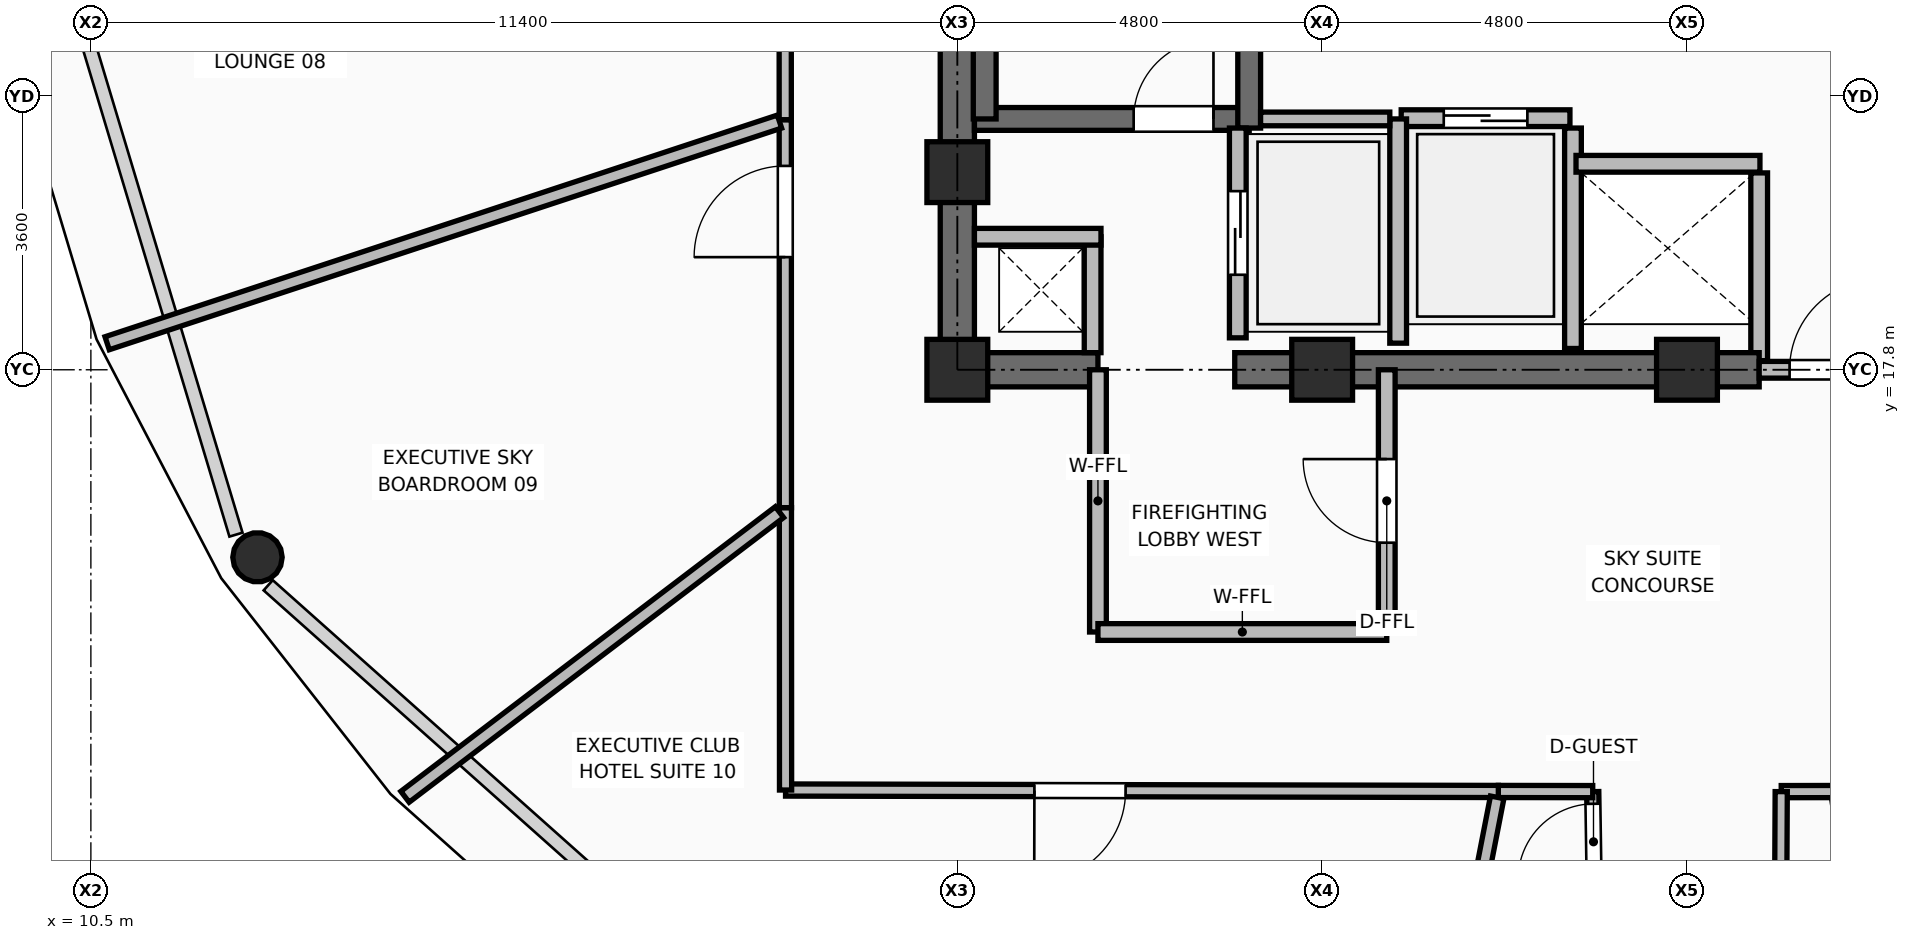
"""IFC4 building model, lengths in metres.
Left out: names, types, materials, properties, quantities, classifications, styles, units other than length and angle.
Written with IfcOpenShell. Run it as: python <this file> out.ifc"""

import sys

from ifc_helpers import new_model, si_unit, direction, frame, frame_2d, origin, origin_2d, place, context, subcontext, project, spatial, rectangle, hollow_circle, extrude, element, fill, save


model = new_model("IFC4")
c1 = context("Model", 3, precision=1e-05, world=origin(), true_north=direction((0.0, 1.0)))
c2 = subcontext(c1, "Body", "Model", "MODEL_VIEW")
j1 = project(units=[si_unit("LENGTHUNIT", "METRE"), si_unit("PLANEANGLEUNIT", "RADIAN")], contexts=[c1])
p1 = place(None, origin())
s1 = spatial("IfcSite", under=j1, at=p1, CompositionType="ELEMENT")
p2 = place(p1, origin())
s2 = spatial("IfcBuilding", under=s1, at=p2, CompositionType="ELEMENT")
p3 = place(p2, frame((0.0, 0.0, 249.9)))
s3 = spatial("IfcBuildingStorey", under=s2, at=p3, CompositionType="ELEMENT", Elevation=249.9)
for number, where, z_axis, x_axis in (
    (1, (21.9, 17.8, 0.0), (0.0, 0.0, 1.0), (1.0, 0.0, 0.0)),
    (2, (26.7, 17.8, 0.0), (0.0, 0.0, 1.0), (1.0, 0.0, 0.0)),
    (3, (31.5, 17.8, 0.0), (0.0, 0.0, 1.0), (1.0, 0.0, 0.0)),
    (4, (21.9, 20.4, 0.0), (0.0, 0.0, 1.0), (1.0, 0.0, 0.0)),
):
    element("IfcColumn", number, at=place(p3, frame(where, z_axis=z_axis, x_axis=x_axis)), inside=s3, PredefinedType="COLUMN", context=c2, shape_type="SweptSolid", body=[
        extrude(rectangle(XDim=0.8, YDim=0.8, at=origin_2d()), origin(), (0.0, 0.0, 1.0), 3.75),
    ])
p4 = place(p3, frame((12.692, 15.333, 0.0), z_axis=(0.09041731247, 0.046908751519, 0.9947986121), x_axis=(-0.460516000373, 0.887651403086, 0.0)))
e5 = element("IfcColumn", 5, at=p4, inside=s3, PredefinedType="COLUMN", context=c2, shape_type="SweptSolid", body=[
    extrude(hollow_circle(Radius=0.325, WallThickness=0.03, at=origin_2d()), origin(), (0.0, 0.0, 1.0), 3.518),
])
p5 = place(p3, frame((30.0, 18.08, 0.0), z_axis=(0.0, 0.0, 1.0), x_axis=(0.0, 1.0, 0.0)))
e6 = element("IfcWall", 6, at=p5, inside=s3, PredefinedType="PARTITIONING", context=c2, shape_type="SweptSolid", body=[
    extrude(rectangle(XDim=2.9, YDim=0.22, at=frame_2d((1.45, 0.0))), origin(), (0.0, 0.0, 1.0), 3.475),
])
p6 = place(p3, frame((32.45, 17.92, 0.0), z_axis=(0.0, 0.0, 1.0), x_axis=(0.0, 1.0, 0.0)))
e7 = element("IfcWall", 7, at=p6, inside=s3, PredefinedType="PARTITIONING", context=c2, shape_type="SweptSolid", body=[
    extrude(rectangle(XDim=2.47, YDim=0.22, at=frame_2d((1.235, 0.0))), origin(), (0.0, 0.0, 1.0), 3.475),
])
p7 = place(p3, frame((21.675, 17.8, 0.0), z_axis=(0.0, 0.0, 1.0), x_axis=(1.0, 0.0, 0.0)))
e8 = element("IfcWall", 8, at=p7, inside=s3, PredefinedType="SHEAR", context=c2, shape_type="SweptSolid", body=[
    extrude(rectangle(XDim=2.075, YDim=0.45, at=frame_2d((1.038, 0.0))), origin(), (0.0, 0.0, 1.0), 3.5),
])
p8 = place(p3, frame((25.55, 17.8, 0.0), z_axis=(0.0, 0.0, 1.0), x_axis=(1.0, 0.0, 0.0)))
e9 = element("IfcWall", 9, at=p8, inside=s3, PredefinedType="SHEAR", context=c2, shape_type="SweptSolid", body=[
    extrude(rectangle(XDim=6.9, YDim=0.45, at=frame_2d((3.45, 0.0))), origin(), (0.0, 0.0, 1.0), 3.5),
])
p9 = place(p3, frame((32.45, 17.8, 0.0), z_axis=(0.0, 0.0, 1.0), x_axis=(1.0, 0.0, 0.0)))
e10 = element("IfcWall", 10, at=p9, inside=s3, PredefinedType="PARTITIONING", context=c2, shape_type="SweptSolid", body=[
    extrude(rectangle(XDim=2.5, YDim=0.22, at=frame_2d((1.25, 0.0))), origin(), (0.0, 0.0, 1.0), 3.012),
])
p10 = place(p9, frame((0.4, 0.0, 0.0)))
e11 = element("IfcOpeningElement", 11, at=p10, cuts=e10, PredefinedType="OPENING", context=c2, shape_type="SweptSolid", body=[
    extrude(rectangle(XDim=1.2, YDim=2.1, at=frame_2d((0.6, 1.05))), frame((0.0, 0.12, 0.0), z_axis=(0.0, -1.0, 0.0), x_axis=(1.0, 0.0, 0.0)), (0.0, 0.0, 1.0), 0.24),
])
p11 = place(p3, frame((21.9, 18.025, 0.0), z_axis=(0.0, 0.0, 1.0), x_axis=(0.0, 1.0, 0.0)))
e12 = element("IfcWall", 12, at=p11, inside=s3, PredefinedType="SHEAR", context=c2, shape_type="SweptSolid", body=[
    extrude(rectangle(XDim=14.2, YDim=0.45, at=frame_2d((7.1, 0.0))), origin(), (0.0, 0.0, 1.0), 3.5),
])
p12 = place(p3, frame((22.125, 21.1, 0.0), z_axis=(0.0, 0.0, 1.0), x_axis=(1.0, 0.0, 0.0)))
e13 = element("IfcWall", 13, at=p12, inside=s3, PredefinedType="SHEAR", context=c2, shape_type="SweptSolid", body=[
    extrude(rectangle(XDim=3.615, YDim=0.3, at=frame_2d((1.808, 0.0))), origin(), (0.0, 0.0, 1.0), 3.5),
])
p13 = place(p12, frame((2.095, 0.0, 0.0)))
e14 = element("IfcOpeningElement", 14, at=p13, cuts=e13, PredefinedType="OPENING", context=c2, shape_type="SweptSolid", body=[
    extrude(rectangle(XDim=1.05, YDim=2.1, at=frame_2d((0.525, 1.05))), frame((0.0, 0.16, 0.0), z_axis=(0.0, -1.0, 0.0), x_axis=(1.0, 0.0, 0.0)), (0.0, 0.0, 1.0), 0.32),
])
p14 = place(p3, frame((25.74, 20.98, 0.0), z_axis=(0.0, 0.0, 1.0), x_axis=(0.0, 1.0, 0.0)))
e15 = element("IfcWall", 15, at=p14, inside=s3, PredefinedType="SHEAR", context=c2, shape_type="SweptSolid", body=[
    extrude(rectangle(XDim=7.99, YDim=0.3, at=frame_2d((3.995, 0.0))), origin(), (0.0, 0.0, 1.0), 3.5),
])
p15 = place(p3, frame((22.26, 21.1, 0.0), z_axis=(0.0, 0.0, 1.0), x_axis=(0.0, 1.0, 0.0)))
e16 = element("IfcWall", 16, at=p15, inside=s3, PredefinedType="SHEAR", context=c2, shape_type="SweptSolid", body=[
    extrude(rectangle(XDim=7.75, YDim=0.3, at=frame_2d((3.875, 0.0))), origin(), (0.0, 0.0, 1.0), 3.5),
])
p16 = place(p3, frame((23.68, 18.025, 0.0), z_axis=(0.0, 0.0, 1.0), x_axis=(0.0, 1.0, 0.0)))
e17 = element("IfcWall", 17, at=p16, inside=s3, PredefinedType="PARTITIONING", context=c2, shape_type="SweptSolid", body=[
    extrude(rectangle(XDim=1.525, YDim=0.22, at=frame_2d((0.763, 0.0))), origin(), (0.0, 0.0, 1.0), 3.48),
])
p17 = place(p3, frame((22.125, 19.55, 0.0), z_axis=(0.0, 0.0, 1.0), x_axis=(1.0, 0.0, 0.0)))
e18 = element("IfcWall", 18, at=p17, inside=s3, PredefinedType="PARTITIONING", context=c2, shape_type="SweptSolid", body=[
    extrude(rectangle(XDim=1.665, YDim=0.22, at=frame_2d((0.833, 0.0))), origin(), (0.0, 0.0, 1.0), 2.525),
])
p18 = place(p3, frame((25.59, 18.22, 0.0), z_axis=(0.0, 0.0, 1.0), x_axis=(0.0, 1.0, 0.0)))
e19 = element("IfcWall", 19, at=p18, inside=s3, PredefinedType="PARTITIONING", context=c2, shape_type="SweptSolid", body=[
    extrude(rectangle(XDim=2.76, YDim=0.22, at=frame_2d((1.38, 0.0))), origin(), (0.0, 0.0, 1.0), 3.48),
])
p19 = place(p18, frame((0.83, 0.0, 0.0)))
e20 = element("IfcOpeningElement", 20, at=p19, cuts=e19, PredefinedType="OPENING", context=c2, shape_type="SweptSolid", body=[
    extrude(rectangle(XDim=1.1, YDim=2.2, at=frame_2d((0.55, 1.1))), frame((0.0, 0.12, 0.0), z_axis=(0.0, -1.0, 0.0), x_axis=(1.0, 0.0, 0.0)), (0.0, 0.0, 1.0), 0.24),
])
p20 = place(p3, frame((27.74, 21.11, 0.0), z_axis=(0.0, 0.0, 1.0), x_axis=(1.0, 0.0, 0.0)))
e21 = element("IfcWall", 21, at=p20, inside=s3, PredefinedType="PARTITIONING", context=c2, shape_type="SweptSolid", body=[
    extrude(rectangle(XDim=2.22, YDim=0.22, at=frame_2d((1.11, 0.0))), origin(), (0.0, 0.0, 1.0), 3.48),
])
p21 = place(p20, frame((0.56, 0.0, 0.0)))
e22 = element("IfcOpeningElement", 22, at=p21, cuts=e21, PredefinedType="OPENING", context=c2, shape_type="SweptSolid", body=[
    extrude(rectangle(XDim=1.1, YDim=2.2, at=frame_2d((0.55, 1.1))), frame((0.0, 0.12, 0.0), z_axis=(0.0, -1.0, 0.0), x_axis=(1.0, 0.0, 0.0)), (0.0, 0.0, 1.0), 0.24),
])
p22 = place(p3, frame((30.04, 20.51, 0.0), z_axis=(0.0, 0.0, 1.0), x_axis=(1.0, 0.0, 0.0)))
e23 = element("IfcWall", 23, at=p22, inside=s3, PredefinedType="PARTITIONING", context=c2, shape_type="SweptSolid", body=[
    extrude(rectangle(XDim=2.42, YDim=0.22, at=frame_2d((1.21, 0.0))), origin(), (0.0, 0.0, 1.0), 3.48),
])
p23 = place(p3, frame((27.7, 18.15, 0.0), z_axis=(0.0, 0.0, 1.0), x_axis=(0.0, 1.0, 0.0)))
e24 = element("IfcWall", 24, at=p23, inside=s3, PredefinedType="PARTITIONING", context=c2, shape_type="SweptSolid", body=[
    extrude(rectangle(XDim=2.95, YDim=0.22, at=frame_2d((1.475, 0.0))), origin(), (0.0, 0.0, 1.0), 3.48),
])
p24 = place(p3, frame((25.89, 21.1, 0.0), z_axis=(0.0, 0.0, 1.0), x_axis=(1.0, 0.0, 0.0)))
e25 = element("IfcWall", 25, at=p24, inside=s3, PredefinedType="PARTITIONING", context=c2, shape_type="SweptSolid", body=[
    extrude(rectangle(XDim=1.7, YDim=0.18, at=frame_2d((0.85, 0.0))), origin(), (0.0, 0.0, 1.0), 3.48),
])
p25 = place(p3, frame((23.75, 14.35, 0.0), z_axis=(0.0, 0.0, 1.0), x_axis=(0.0, 1.0, 0.0)))
e26 = element("IfcWall", 26, at=p25, inside=s3, PredefinedType="PARTITIONING", context=c2, shape_type="SweptSolid", body=[
    extrude(rectangle(XDim=3.45, YDim=0.22, at=frame_2d((1.725, 0.0))), origin(), (0.0, 0.0, 1.0), 3.012),
])
p26 = place(p3, frame((23.75, 14.35, 0.0), z_axis=(0.0, 0.0, 1.0), x_axis=(1.0, 0.0, 0.0)))
e27 = element("IfcWall", 27, at=p26, inside=s3, PredefinedType="PARTITIONING", context=c2, shape_type="SweptSolid", body=[
    extrude(rectangle(XDim=3.8, YDim=0.22, at=frame_2d((1.9, 0.0))), origin(), (0.0, 0.0, 1.0), 3.48),
])
p27 = place(p3, frame((27.55, 14.35, 0.0), z_axis=(0.0, 0.0, 1.0), x_axis=(0.0, 1.0, 0.0)))
e28 = element("IfcWall", 28, at=p27, inside=s3, PredefinedType="PARTITIONING", context=c2, shape_type="SweptSolid", body=[
    extrude(rectangle(XDim=3.45, YDim=0.22, at=frame_2d((1.725, 0.0))), origin(), (0.0, 0.0, 1.0), 3.012),
])
p28 = place(p27, frame((1.175, 0.0, 0.0)))
e29 = element("IfcOpeningElement", 29, at=p28, cuts=e28, PredefinedType="OPENING", context=c2, shape_type="SweptSolid", body=[
    extrude(rectangle(XDim=1.1, YDim=2.1, at=frame_2d((0.55, 1.05))), frame((0.0, 0.12, 0.0), z_axis=(0.0, -1.0, 0.0), x_axis=(1.0, 0.0, 0.0)), (0.0, 0.0, 1.0), 0.24),
])
p29 = place(p3, frame((33.479, 12.251, 0.0), z_axis=(0.0, 0.0, 1.0), x_axis=(-0.999999126899, -0.001321439216, 0.0)))
e30 = element("IfcWall", 30, at=p29, inside=s3, PredefinedType="PARTITIONING", context=c2, shape_type="SweptSolid", body=[
    extrude(rectangle(XDim=0.739, YDim=0.16, at=frame_2d((0.37, 0.0))), origin(), (0.0, 0.0, 1.0), 3.48),
])
p30 = place(p3, frame((32.74, 12.25, 0.0), z_axis=(0.0, 0.0, 1.0), x_axis=(-0.005066629207, -0.999987164552, 0.0)))
e31 = element("IfcWall", 31, at=p30, inside=s3, PredefinedType="PARTITIONING", context=c2, shape_type="SweptSolid", body=[
    extrude(rectangle(XDim=2.361, YDim=0.16, at=frame_2d((1.181, 0.0))), origin(), (0.0, 0.0, 1.0), 3.48),
])
p31 = place(p3, frame((30.296, 9.877, 0.0), z_axis=(0.0, 0.0, 1.0), x_axis=(-0.015121727576, 0.999885660141, 0.0)))
e32 = element("IfcWall", 32, at=p31, inside=s3, PredefinedType="PARTITIONING", context=c2, shape_type="SweptSolid", body=[
    extrude(rectangle(XDim=2.373, YDim=0.16, at=frame_2d((1.187, 0.0))), origin(), (0.0, 0.0, 1.0), 3.48),
])
p32 = place(p31, frame((1.213, 0.0, 0.0)))
e33 = element("IfcOpeningElement", 33, at=p32, cuts=e32, PredefinedType="OPENING", context=c2, shape_type="SweptSolid", body=[
    extrude(rectangle(XDim=1.0, YDim=2.1, at=frame_2d((0.5, 1.05))), frame((0.0, 0.09, 0.0), z_axis=(0.0, -1.0, 0.0), x_axis=(1.0, 0.0, 0.0)), (0.0, 0.0, 1.0), 0.18),
])
p33 = place(p3, frame((30.26, 12.25, 0.0), z_axis=(0.0, 0.0, 1.0), x_axis=(-0.99999876341, 0.001572634187, 0.0)))
e34 = element("IfcWall", 34, at=p33, inside=s3, PredefinedType="PARTITIONING", context=c2, shape_type="SweptSolid", body=[
    extrude(rectangle(XDim=1.242, YDim=0.16, at=frame_2d((0.621, 0.0))), origin(), (0.0, 0.0, 1.0), 3.48),
])
p34 = place(p3, frame((29.018, 12.252, 0.0), z_axis=(0.0, 0.0, 1.0), x_axis=(-0.999997938414, 0.002030558384, 0.0)))
e35 = element("IfcWall", 35, at=p34, inside=s3, PredefinedType="PARTITIONING", context=c2, shape_type="SweptSolid", body=[
    extrude(rectangle(XDim=9.378, YDim=0.16, at=frame_2d((4.689, 0.0))), origin(), (0.0, 0.0, 1.0), 3.012),
])
p35 = place(p34, frame((4.904, 0.0, 0.0)))
e36 = element("IfcOpeningElement", 36, at=p35, cuts=e35, PredefinedType="OPENING", context=c2, shape_type="SweptSolid", body=[
    extrude(rectangle(XDim=1.2, YDim=2.1, at=frame_2d((0.6, 1.05))), frame((0.0, 0.09, 0.0), z_axis=(0.0, -1.0, 0.0), x_axis=(1.0, 0.0, 0.0)), (0.0, 0.0, 1.0), 0.18),
])
p36 = place(p3, frame((19.64, 12.271, 0.0), z_axis=(0.0, 0.0, 1.0), x_axis=(-0.000525727732, 0.999999861805, 0.0)))
e37 = element("IfcWall", 37, at=p36, inside=s3, PredefinedType="PARTITIONING", context=c2, shape_type="SweptSolid", body=[
    extrude(rectangle(XDim=3.715, YDim=0.16, at=frame_2d((1.857, 0.0))), origin(), (0.0, 0.0, 1.0), 3.48),
])
p37 = place(p3, frame((19.638, 15.986, 0.0), z_axis=(0.0, 0.0, 1.0), x_axis=(-0.000382665236, 0.999999926784, 0.0)))
e38 = element("IfcWall", 38, at=p37, inside=s3, PredefinedType="PARTITIONING", context=c2, shape_type="SweptSolid", body=[
    extrude(rectangle(XDim=5.104, YDim=0.16, at=frame_2d((2.552, 0.0))), origin(), (0.0, 0.0, 1.0), 3.012),
])
p38 = place(p37, frame((3.296, 0.0, 0.0)))
e39 = element("IfcOpeningElement", 39, at=p38, cuts=e38, PredefinedType="OPENING", context=c2, shape_type="SweptSolid", body=[
    extrude(rectangle(XDim=1.2, YDim=2.1, at=frame_2d((0.6, 1.05))), frame((0.0, 0.09, 0.0), z_axis=(0.0, -1.0, 0.0), x_axis=(1.0, 0.0, 0.0)), (0.0, 0.0, 1.0), 0.18),
])
p39 = place(p3, frame((19.636, 21.09, 0.0), z_axis=(0.0, 0.0, 1.0), x_axis=(-0.000353325656, 0.99999993758, 0.0)))
e40 = element("IfcWall", 40, at=p39, inside=s3, PredefinedType="PARTITIONING", context=c2, shape_type="SweptSolid", body=[
    extrude(rectangle(XDim=2.764, YDim=0.16, at=frame_2d((1.382, 0.0))), origin(), (0.0, 0.0, 1.0), 3.012),
])
p40 = place(p39, frame((1.404, 0.0, 0.0)))
e41 = element("IfcOpeningElement", 41, at=p40, cuts=e40, PredefinedType="OPENING", context=c2, shape_type="SweptSolid", body=[
    extrude(rectangle(XDim=1.2, YDim=2.1, at=frame_2d((0.6, 1.05))), frame((0.0, 0.09, 0.0), z_axis=(0.0, -1.0, 0.0), x_axis=(1.0, 0.0, 0.0)), (0.0, 0.0, 1.0), 0.18),
])
p41 = place(p3, frame((19.56, 21.065, 0.0), z_axis=(0.0, 0.0, 1.0), x_axis=(-0.949729147415, -0.313072749613, 0.0)))
e42 = element("IfcWall", 42, at=p41, inside=s3, PredefinedType="PARTITIONING", context=c2, shape_type="SweptSolid", body=[
    extrude(rectangle(XDim=9.314, YDim=0.18, at=frame_2d((4.657, 0.0))), origin(), (0.0, 0.0, 1.0), 2.855),
])
p42 = place(p3, frame((19.56, 15.927, 0.0), z_axis=(0.0, 0.0, 1.0), x_axis=(-0.796115821465, -0.605144279336, 0.0)))
e43 = element("IfcWall", 43, at=p42, inside=s3, PredefinedType="PARTITIONING", context=c2, shape_type="SweptSolid", body=[
    extrude(rectangle(XDim=6.189, YDim=0.18, at=frame_2d((3.094, 0.0))), origin(), (0.0, 0.0, 1.0), 2.855),
])
p43 = place(p3, frame((29.003, 12.175, 0.0), z_axis=(0.0, 0.0, 1.0), x_axis=(-0.191104607793, -0.981569676019, 0.0)))
e44 = element("IfcWall", 44, at=p43, inside=s3, PredefinedType="PARTITIONING", context=c2, shape_type="SweptSolid", body=[
    extrude(rectangle(XDim=6.786, YDim=0.18, at=frame_2d((3.393, 0.0))), origin(), (0.0, 0.0, 1.0), 2.855),
])
p44 = place(p10, origin())
e45 = element("IfcDoor", 45, at=p44, inside=s3, OperationType="SINGLE_SWING_RIGHT", PredefinedType="DOOR", context=c2, shape_type="SweptSolid", body=[
    extrude(rectangle(XDim=1.2, YDim=2.1, at=frame_2d((0.6, 1.05))), frame((0.0, 0.025, 0.0), z_axis=(0.0, -1.0, 0.0), x_axis=(1.0, 0.0, 0.0)), (0.0, 0.0, 1.0), 0.05),
])
fill(e11, e45)
p45 = place(p13, origin())
e46 = element("IfcDoor", 46, at=p45, inside=s3, OperationType="SINGLE_SWING_RIGHT", PredefinedType="DOOR", context=c2, shape_type="SweptSolid", body=[
    extrude(rectangle(XDim=1.05, YDim=2.1, at=frame_2d((0.525, 1.05))), frame((0.0, 0.025, 0.0), z_axis=(0.0, -1.0, 0.0), x_axis=(1.0, 0.0, 0.0)), (0.0, 0.0, 1.0), 0.05),
])
fill(e14, e46)
p46 = place(p19, origin())
e47 = element("IfcDoor", 47, at=p46, inside=s3, OperationType="DOUBLE_DOOR_SLIDING", PredefinedType="DOOR", context=c2, shape_type="SweptSolid", body=[
    extrude(rectangle(XDim=1.1, YDim=2.2, at=frame_2d((0.55, 1.1))), frame((0.0, 0.025, 0.0), z_axis=(0.0, -1.0, 0.0), x_axis=(1.0, 0.0, 0.0)), (0.0, 0.0, 1.0), 0.05),
])
fill(e20, e47)
p47 = place(p21, origin())
e48 = element("IfcDoor", 48, at=p47, inside=s3, OperationType="DOUBLE_DOOR_SLIDING", PredefinedType="DOOR", context=c2, shape_type="SweptSolid", body=[
    extrude(rectangle(XDim=1.1, YDim=2.2, at=frame_2d((0.55, 1.1))), frame((0.0, 0.025, 0.0), z_axis=(0.0, -1.0, 0.0), x_axis=(1.0, 0.0, 0.0)), (0.0, 0.0, 1.0), 0.05),
])
fill(e22, e48)
p48 = place(p28, origin())
e49 = element("IfcDoor", 49, at=p48, inside=s3, OperationType="SINGLE_SWING_RIGHT", PredefinedType="DOOR", context=c2, shape_type="SweptSolid", body=[
    extrude(rectangle(XDim=1.1, YDim=2.1, at=frame_2d((0.55, 1.05))), frame((0.0, 0.025, 0.0), z_axis=(0.0, -1.0, 0.0), x_axis=(1.0, 0.0, 0.0)), (0.0, 0.0, 1.0), 0.05),
])
fill(e29, e49)
p49 = place(p38, origin())
e50 = element("IfcDoor", 50, at=p49, inside=s3, OperationType="SINGLE_SWING_LEFT", PredefinedType="DOOR", context=c2, shape_type="SweptSolid", body=[
    extrude(rectangle(XDim=1.2, YDim=2.1, at=frame_2d((0.6, 1.05))), frame((0.0, 0.025, 0.0), z_axis=(0.0, -1.0, 0.0), x_axis=(1.0, 0.0, 0.0)), (0.0, 0.0, 1.0), 0.05),
])
fill(e39, e50)
p50 = place(p35, origin())
e51 = element("IfcDoor", 51, at=p50, inside=s3, OperationType="SINGLE_SWING_RIGHT", PredefinedType="DOOR", context=c2, shape_type="SweptSolid", body=[
    extrude(rectangle(XDim=1.2, YDim=2.1, at=frame_2d((0.6, 1.05))), frame((0.0, 0.025, 0.0), z_axis=(0.0, -1.0, 0.0), x_axis=(1.0, 0.0, 0.0)), (0.0, 0.0, 1.0), 0.05),
])
fill(e36, e51)
p51 = place(p32, origin())
e52 = element("IfcDoor", 52, at=p51, inside=s3, OperationType="SINGLE_SWING_LEFT", PredefinedType="DOOR", context=c2, shape_type="SweptSolid", body=[
    extrude(rectangle(XDim=1.0, YDim=2.1, at=frame_2d((0.5, 1.05))), frame((0.0, 0.025, 0.0), z_axis=(0.0, -1.0, 0.0), x_axis=(1.0, 0.0, 0.0)), (0.0, 0.0, 1.0), 0.05),
])
fill(e33, e52)
save(model, sys.argv[1])
